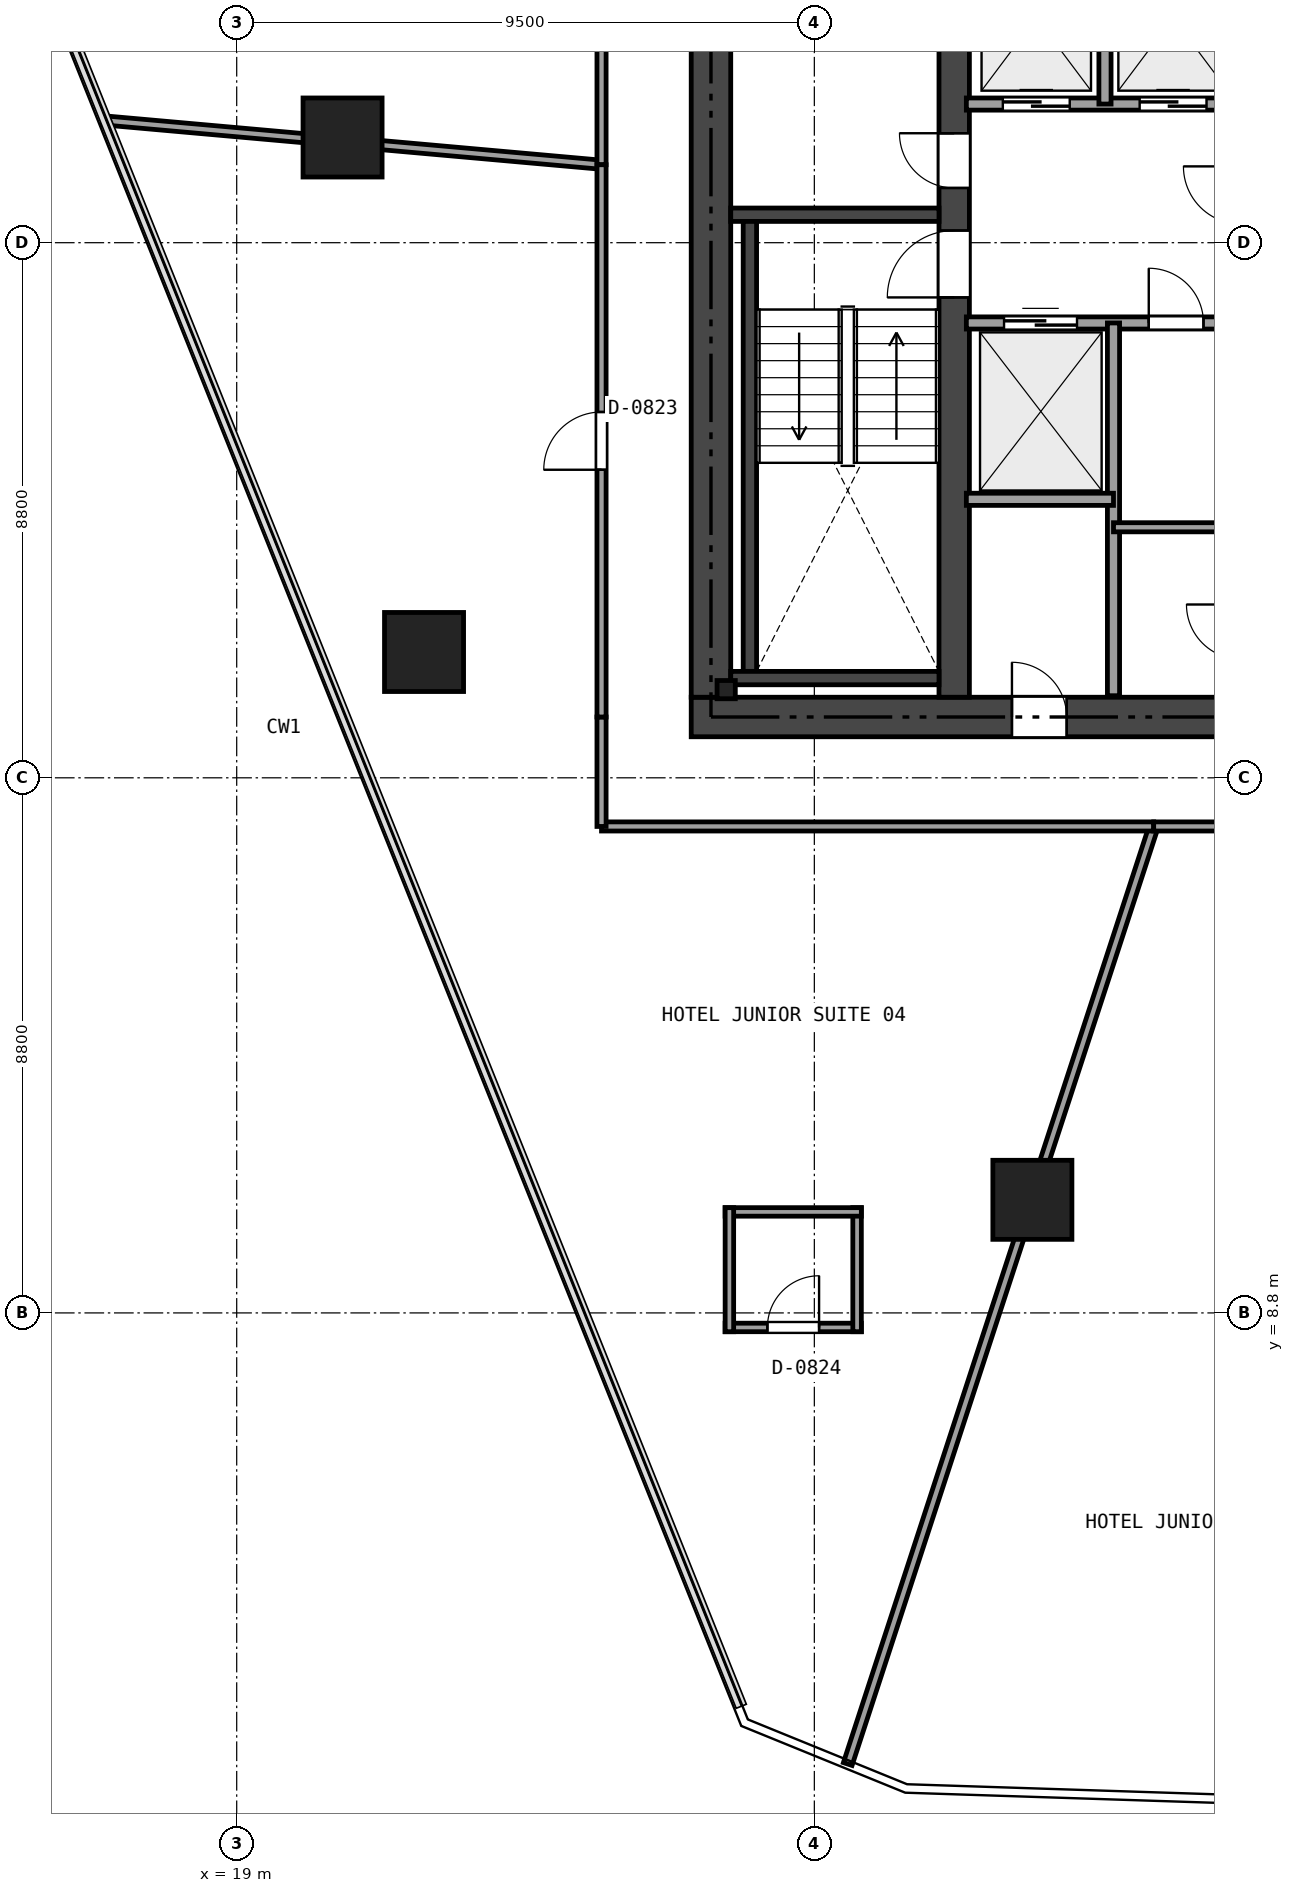
"""IFC4 building model, lengths in metres.
Left out: names, types, materials, properties, quantities, classifications, styles, units other than length and angle.
Written with IfcOpenShell. Run it as: python <this file> out.ifc"""

import sys

from ifc_helpers import new_model, si_unit, direction, frame, frame_2d, origin, origin_2d, place, context, subcontext, project, spatial, rectangle, i_section, extrude, element, fill, save


model = new_model("IFC4")
c1 = context("Model", 3, precision=1e-05, world=origin(), true_north=direction((0.0, 1.0)))
c2 = subcontext(c1, "Body", "Model", "MODEL_VIEW")
j1 = project(units=[si_unit("LENGTHUNIT", "METRE"), si_unit("PLANEANGLEUNIT", "RADIAN")], contexts=[c1])
p1 = place(None, origin())
s1 = spatial("IfcSite", under=j1, at=p1, CompositionType="ELEMENT")
p2 = place(p1, origin())
s2 = spatial("IfcBuilding", under=s1, at=p2, CompositionType="ELEMENT")
p3 = place(p2, frame((0.0, 0.0, 37.35)))
s3 = spatial("IfcBuildingStorey", under=s2, at=p3, CompositionType="ELEMENT", Elevation=37.35)
p4 = place(p3, frame((26.475, 18.6, 0.0), z_axis=(0.0, 0.0, 1.0), x_axis=(1.0, 0.0, 0.0)))
e1 = element("IfcWall", 1, at=p4, inside=s3, PredefinedType="SHEAR", context=c2, shape_type="SweptSolid", body=[
    extrude(rectangle(XDim=21.45, YDim=0.65, at=frame_2d((10.725, 0.0))), origin(), (0.0, 0.0, 1.0), 3.17),
])
p5 = place(p4, frame((12.45, 0.0, 0.0)))
e2 = element("IfcOpeningElement", 2, at=p5, cuts=e1, PredefinedType="OPENING", context=c2, shape_type="SweptSolid", body=[
    extrude(rectangle(XDim=1.15, YDim=2.15, at=frame_2d((0.575, 1.075))), frame((0.0, 0.335, 0.0), z_axis=(0.0, -1.0, 0.0), x_axis=(1.0, 0.0, 0.0)), (0.0, 0.0, 1.0), 0.67),
])
p6 = place(p4, frame((5.275, 0.0, 0.0)))
e3 = element("IfcOpeningElement", 3, at=p6, cuts=e1, PredefinedType="OPENING", context=c2, shape_type="SweptSolid", body=[
    extrude(rectangle(XDim=0.9, YDim=2.1, at=frame_2d((0.45, 1.05))), frame((0.0, 0.335, 0.0), z_axis=(0.0, -1.0, 0.0), x_axis=(1.0, 0.0, 0.0)), (0.0, 0.0, 1.0), 0.67),
])
p7 = place(p3, frame((26.8, 18.925, 0.0), z_axis=(0.0, 0.0, 1.0), x_axis=(0.0, 1.0, 0.0)))
e4 = element("IfcWall", 4, at=p7, inside=s3, PredefinedType="SHEAR", context=c2, shape_type="SweptSolid", body=[
    extrude(rectangle(XDim=14.95, YDim=0.65, at=frame_2d((7.475, 0.0))), origin(), (0.0, 0.0, 1.0), 3.17),
])
p8 = place(p3, frame((30.8, 18.925, 0.0), z_axis=(0.0, 0.0, 1.0), x_axis=(0.0, 1.0, 0.0)))
e5 = element("IfcWall", 5, at=p8, inside=s3, PredefinedType="SHEAR", context=c2, shape_type="SweptSolid", body=[
    extrude(rectangle(XDim=14.95, YDim=0.5, at=frame_2d((7.475, 0.0))), origin(), (0.0, 0.0, 1.0), 3.17),
])
p9 = place(p8, frame((6.575, 0.0, 0.0)))
e6 = element("IfcOpeningElement", 6, at=p9, cuts=e5, PredefinedType="OPENING", context=c2, shape_type="SweptSolid", body=[
    extrude(rectangle(XDim=1.1, YDim=2.15, at=frame_2d((0.55, 1.075))), frame((0.0, 0.26, 0.0), z_axis=(0.0, -1.0, 0.0), x_axis=(1.0, 0.0, 0.0)), (0.0, 0.0, 1.0), 0.52),
])
p10 = place(p8, frame((8.375, 0.0, 0.0)))
e7 = element("IfcOpeningElement", 7, at=p10, cuts=e5, PredefinedType="OPENING", context=c2, shape_type="SweptSolid", body=[
    extrude(rectangle(XDim=0.9, YDim=2.1, at=frame_2d((0.45, 1.05))), frame((0.0, 0.26, 0.0), z_axis=(0.0, -1.0, 0.0), x_axis=(1.0, 0.0, 0.0)), (0.0, 0.0, 1.0), 0.52),
])
p11 = place(p3, frame((27.125, 26.86, 0.0), z_axis=(0.0, 0.0, 1.0), x_axis=(1.0, 0.0, 0.0)))
e8 = element("IfcWall", 8, at=p11, inside=s3, PredefinedType="SHEAR", context=c2, shape_type="SweptSolid", body=[
    extrude(rectangle(XDim=3.425, YDim=0.22, at=frame_2d((1.712, 0.0))), origin(), (0.0, 0.0, 1.0), 3.17),
])
p12 = place(p3, frame((27.44, 19.35, 0.0), z_axis=(0.0, 0.0, 1.0), x_axis=(0.0, 1.0, 0.0)))
e9 = element("IfcWall", 9, at=p12, inside=s3, PredefinedType="SHEAR", context=c2, shape_type="SweptSolid", body=[
    extrude(rectangle(XDim=7.4, YDim=0.22, at=frame_2d((3.7, 0.0))), origin(), (0.0, 0.0, 1.0), 3.17),
])
p13 = place(p3, frame((27.125, 19.24, 0.0), z_axis=(0.0, 0.0, 1.0), x_axis=(1.0, 0.0, 0.0)))
e10 = element("IfcWall", 10, at=p13, inside=s3, PredefinedType="SHEAR", context=c2, shape_type="SweptSolid", body=[
    extrude(rectangle(XDim=3.425, YDim=0.22, at=frame_2d((1.712, 0.0))), origin(), (0.0, 0.0, 1.0), 3.17),
])
for number, where, z_axis, x_axis in (
    (11, (20.741, 28.13, 0.0), (0.0, 0.0, 1.0), (1.0, 0.0, 0.0)),
    (12, (22.081, 19.669, 0.0), (0.0, 0.0, 1.0), (1.0, 0.0, 0.0)),
    (13, (32.086, 10.66, 0.0), (0.0, 0.0, 1.0), (1.0, 0.0, 0.0)),
):
    element("IfcColumn", number, at=place(p3, frame(where, z_axis=z_axis, x_axis=x_axis)), inside=s3, PredefinedType="COLUMN", context=c2, shape_type="SweptSolid", body=[
        extrude(rectangle(XDim=1.3, YDim=1.3, at=origin_2d()), origin(), (0.0, 0.0, 1.0), 3.17),
    ])
p14 = place(p3, frame((27.05, 19.05, 0.0), z_axis=(0.0, 0.0, 1.0), x_axis=(1.0, 0.0, 0.0)))
e14 = element("IfcColumn", 14, at=p14, inside=s3, PredefinedType="PILASTER", context=c2, shape_type="SweptSolid", body=[
    extrude(i_section(OverallWidth=0.3, OverallDepth=0.3, WebThickness=0.011, FlangeThickness=0.019, at=origin_2d()), origin(), (0.0, 0.0, 1.0), 3.17),
])
p15 = place(p3, frame((31.0, 28.68, 0.0), z_axis=(0.0, 0.0, 1.0), x_axis=(1.0, 0.0, 0.0)))
e15 = element("IfcWall", 15, at=p15, inside=s3, PredefinedType="SOLIDWALL", context=c2, shape_type="SweptSolid", body=[
    extrude(rectangle(XDim=4.42, YDim=0.2, at=frame_2d((2.21, 0.0))), origin(), (0.0, 0.0, 1.0), 3.17),
])
p16 = place(p15, frame((0.6, 0.0, 0.0)))
e16 = element("IfcOpeningElement", 16, at=p16, cuts=e15, PredefinedType="OPENING", context=c2, shape_type="SweptSolid", body=[
    extrude(rectangle(XDim=1.1, YDim=2.15, at=frame_2d((0.55, 1.075))), frame((0.0, 0.11, 0.0), z_axis=(0.0, -1.0, 0.0), x_axis=(1.0, 0.0, 0.0)), (0.0, 0.0, 1.0), 0.22),
])
p17 = place(p15, frame((2.85, 0.0, 0.0)))
e17 = element("IfcOpeningElement", 17, at=p17, cuts=e15, PredefinedType="OPENING", context=c2, shape_type="SweptSolid", body=[
    extrude(rectangle(XDim=1.1, YDim=2.15, at=frame_2d((0.55, 1.075))), frame((0.0, 0.11, 0.0), z_axis=(0.0, -1.0, 0.0), x_axis=(1.0, 0.0, 0.0)), (0.0, 0.0, 1.0), 0.22),
])
p18 = place(p3, frame((33.28, 28.68, 0.0), z_axis=(0.0, 0.0, 1.0), x_axis=(0.0, 1.0, 0.0)))
e18 = element("IfcWall", 18, at=p18, inside=s3, PredefinedType="SOLIDWALL", context=c2, shape_type="SweptSolid", body=[
    extrude(rectangle(XDim=2.82, YDim=0.2, at=frame_2d((1.41, 0.0))), origin(), (0.0, 0.0, 1.0), 3.17),
])
p19 = place(p3, frame((31.0, 25.08, 0.0), z_axis=(0.0, 0.0, 1.0), x_axis=(1.0, 0.0, 0.0)))
e19 = element("IfcWall", 19, at=p19, inside=s3, PredefinedType="SOLIDWALL", context=c2, shape_type="SweptSolid", body=[
    extrude(rectangle(XDim=4.42, YDim=0.2, at=frame_2d((2.21, 0.0))), origin(), (0.0, 0.0, 1.0), 3.17),
])
p20 = place(p19, frame((3.0, 0.0, 0.0)))
e20 = element("IfcOpeningElement", 20, at=p20, cuts=e19, PredefinedType="OPENING", context=c2, shape_type="SweptSolid", body=[
    extrude(rectangle(XDim=0.9, YDim=2.1, at=frame_2d((0.45, 1.05))), frame((0.0, 0.11, 0.0), z_axis=(0.0, -1.0, 0.0), x_axis=(1.0, 0.0, 0.0)), (0.0, 0.0, 1.0), 0.22),
])
p21 = place(p19, frame((0.62, 0.0, 0.0)))
e21 = element("IfcOpeningElement", 21, at=p21, cuts=e19, PredefinedType="OPENING", context=c2, shape_type="SweptSolid", body=[
    extrude(rectangle(XDim=1.2, YDim=2.15, at=frame_2d((0.6, 1.075))), frame((0.0, 0.11, 0.0), z_axis=(0.0, -1.0, 0.0), x_axis=(1.0, 0.0, 0.0)), (0.0, 0.0, 1.0), 0.22),
])
p22 = place(p3, frame((33.42, 18.95, 0.0), z_axis=(0.0, 0.0, 1.0), x_axis=(0.0, 1.0, 0.0)))
e22 = element("IfcWall", 22, at=p22, inside=s3, PredefinedType="SOLIDWALL", context=c2, shape_type="SweptSolid", body=[
    extrude(rectangle(XDim=6.13, YDim=0.2, at=frame_2d((3.065, 0.0))), origin(), (0.0, 0.0, 1.0), 2.691),
])
p23 = place(p3, frame((31.0, 22.18, 0.0), z_axis=(0.0, 0.0, 1.0), x_axis=(1.0, 0.0, 0.0)))
e23 = element("IfcWall", 23, at=p23, inside=s3, PredefinedType="SOLIDWALL", context=c2, shape_type="SweptSolid", body=[
    extrude(rectangle(XDim=2.42, YDim=0.2, at=frame_2d((1.21, 0.0))), origin(), (0.0, 0.0, 1.0), 3.17),
])
p24 = place(p3, frame((33.42, 21.72, 0.0), z_axis=(0.0, 0.0, 1.0), x_axis=(1.0, 0.0, 0.0)))
e24 = element("IfcWall", 24, at=p24, inside=s3, PredefinedType="PARTITIONING", context=c2, shape_type="SweptSolid", body=[
    extrude(rectangle(XDim=2.0, YDim=0.15, at=frame_2d((1.0, 0.0))), origin(), (0.0, 0.0, 1.0), 3.17),
])
p25 = place(p3, frame((27.033, 8.561, 0.0), z_axis=(0.0, 0.0, 1.0), x_axis=(1.0, 0.0, 0.0)))
e25 = element("IfcWall", 25, at=p25, inside=s3, PredefinedType="PARTITIONING", context=c2, shape_type="SweptSolid", body=[
    extrude(rectangle(XDim=2.24, YDim=0.14, at=frame_2d((1.12, 0.0))), origin(), (0.0, 0.0, 1.0), 3.17),
])
p26 = place(p25, frame((0.695, 0.0, 0.0)))
e26 = element("IfcOpeningElement", 26, at=p26, cuts=e25, PredefinedType="OPENING", context=c2, shape_type="SweptSolid", body=[
    extrude(rectangle(XDim=0.85, YDim=2.1, at=frame_2d((0.425, 1.05))), frame((0.0, 0.08, 0.0), z_axis=(0.0, -1.0, 0.0), x_axis=(1.0, 0.0, 0.0)), (0.0, 0.0, 1.0), 0.16),
])
p27 = place(p3, frame((29.203, 8.491, 0.0), z_axis=(0.0, 0.0, 1.0), x_axis=(0.0, 1.0, 0.0)))
e27 = element("IfcWall", 27, at=p27, inside=s3, PredefinedType="PARTITIONING", context=c2, shape_type="SweptSolid", body=[
    extrude(rectangle(XDim=2.04, YDim=0.14, at=frame_2d((1.02, 0.0))), origin(), (0.0, 0.0, 1.0), 3.17),
])
p28 = place(p3, frame((29.273, 10.461, 0.0), z_axis=(0.0, 0.0, 1.0), x_axis=(-1.0, 0.0, 0.0)))
e28 = element("IfcWall", 28, at=p28, inside=s3, PredefinedType="PARTITIONING", context=c2, shape_type="SweptSolid", body=[
    extrude(rectangle(XDim=2.24, YDim=0.14, at=frame_2d((1.12, 0.0))), origin(), (0.0, 0.0, 1.0), 3.17),
])
p29 = place(p3, frame((27.103, 10.531, 0.0), z_axis=(0.0, 0.0, 1.0), x_axis=(0.0, -1.0, 0.0)))
e29 = element("IfcWall", 29, at=p29, inside=s3, PredefinedType="PARTITIONING", context=c2, shape_type="SweptSolid", body=[
    extrude(rectangle(XDim=2.04, YDim=0.14, at=frame_2d((1.02, 0.0))), origin(), (0.0, 0.0, 1.0), 3.17),
])
p30 = place(p3, frame((16.792, 28.414, 0.0), z_axis=(0.0, 0.0, 1.0), x_axis=(0.996045012521, -0.088850059267, 0.0)))
e30 = element("IfcWall", 30, at=p30, inside=s3, PredefinedType="PARTITIONING", context=c2, shape_type="SweptSolid", body=[
    extrude(rectangle(XDim=8.24, YDim=0.15, at=frame_2d((4.12, 0.0))), origin(), (0.0, 0.0, 1.0), 2.395),
])
p31 = place(p3, frame((25.0, 27.682, 0.0), z_axis=(0.0, 0.0, 1.0), x_axis=(0.0, 1.0, 0.0)))
e31 = element("IfcWall", 31, at=p31, inside=s3, PredefinedType="PARTITIONING", context=c2, shape_type="SweptSolid", body=[
    extrude(rectangle(XDim=8.318, YDim=0.15, at=frame_2d((4.159, 0.0))), origin(), (0.0, 0.0, 1.0), 2.355),
])
p32 = place(p31, frame((3.684, 0.0, 0.0)))
e32 = element("IfcOpeningElement", 32, at=p32, cuts=e31, PredefinedType="OPENING", context=c2, shape_type="SweptSolid", body=[
    extrude(rectangle(XDim=0.95, YDim=2.15, at=frame_2d((0.475, 1.075))), frame((0.0, 0.085, 0.0), z_axis=(0.0, -1.0, 0.0), x_axis=(1.0, 0.0, 0.0)), (0.0, 0.0, 1.0), 0.17),
])
p33 = place(p3, frame((29.049, 1.381, 0.0), z_axis=(0.0, 0.0, 1.0), x_axis=(0.310247156609, 0.950655932405, 0.0)))
e33 = element("IfcWall", 33, at=p33, inside=s3, PredefinedType="PARTITIONING", context=c2, shape_type="SweptSolid", body=[
    extrude(rectangle(XDim=16.219, YDim=0.15, at=frame_2d((8.11, 0.0))), origin(), (0.0, 0.0, 1.0), 2.395),
])
p34 = place(p3, frame((34.081, 16.8, 0.0), z_axis=(0.0, 0.0, 1.0), x_axis=(-1.0, 0.0, 0.0)))
e34 = element("IfcWall", 34, at=p34, inside=s3, PredefinedType="PARTITIONING", context=c2, shape_type="SweptSolid", body=[
    extrude(rectangle(XDim=9.081, YDim=0.15, at=frame_2d((4.541, 0.0))), origin(), (0.0, 0.0, 1.0), 2.355),
])
p35 = place(p3, frame((25.0, 16.8, 0.0), z_axis=(0.0, 0.0, 1.0), x_axis=(0.0, 1.0, 0.0)))
e35 = element("IfcWall", 35, at=p35, inside=s3, PredefinedType="PARTITIONING", context=c2, shape_type="SweptSolid", body=[
    extrude(rectangle(XDim=1.8, YDim=0.15, at=frame_2d((0.9, 0.0))), origin(), (0.0, 0.0, 1.0), 2.355),
])
p36 = place(p3, frame((25.0, 18.6, 0.0), z_axis=(0.0, 0.0, 1.0), x_axis=(0.0, 1.0, 0.0)))
e36 = element("IfcWall", 36, at=p36, inside=s3, PredefinedType="PARTITIONING", context=c2, shape_type="SweptSolid", body=[
    extrude(rectangle(XDim=9.082, YDim=0.15, at=frame_2d((4.541, 0.0))), origin(), (0.0, 0.0, 1.0), 2.395),
])
p37 = place(p36, frame((4.066, 0.0, 0.0)))
e37 = element("IfcOpeningElement", 37, at=p37, cuts=e36, PredefinedType="OPENING", context=c2, shape_type="SweptSolid", body=[
    extrude(rectangle(XDim=0.95, YDim=2.15, at=frame_2d((0.475, 1.075))), frame((0.0, 0.085, 0.0), z_axis=(0.0, -1.0, 0.0), x_axis=(1.0, 0.0, 0.0)), (0.0, 0.0, 1.0), 0.17),
])
p38 = place(p3, frame((41.079, 16.8, 0.0), z_axis=(0.0, 0.0, 1.0), x_axis=(-1.0, 0.0, 0.0)))
e38 = element("IfcWall", 38, at=p38, inside=s3, PredefinedType="PARTITIONING", context=c2, shape_type="SweptSolid", body=[
    extrude(rectangle(XDim=6.998, YDim=0.15, at=frame_2d((3.499, 0.0))), origin(), (0.0, 0.0, 1.0), 2.395),
])
p39 = place(p38, frame((3.024, 0.0, 0.0)))
e39 = element("IfcOpeningElement", 39, at=p39, cuts=e38, PredefinedType="OPENING", context=c2, shape_type="SweptSolid", body=[
    extrude(rectangle(XDim=0.95, YDim=2.15, at=frame_2d((0.475, 1.075))), frame((0.0, 0.085, 0.0), z_axis=(0.0, -1.0, 0.0), x_axis=(1.0, 0.0, 0.0)), (0.0, 0.0, 1.0), 0.17),
])
p40 = place(p9, origin())
e40 = element("IfcDoor", 40, at=p40, inside=s3, OperationType="SINGLE_SWING_LEFT", PredefinedType="DOOR", context=c2, shape_type="SweptSolid", body=[
    extrude(rectangle(XDim=1.1, YDim=2.15, at=frame_2d((0.55, 1.075))), frame((0.0, 0.025, 0.0), z_axis=(0.0, -1.0, 0.0), x_axis=(1.0, 0.0, 0.0)), (0.0, 0.0, 1.0), 0.05),
])
fill(e6, e40)
p41 = place(p10, origin())
e41 = element("IfcDoor", 41, at=p41, inside=s3, OperationType="SINGLE_SWING_RIGHT", PredefinedType="DOOR", context=c2, shape_type="SweptSolid", body=[
    extrude(rectangle(XDim=0.9, YDim=2.1, at=frame_2d((0.45, 1.05))), frame((0.0, 0.025, 0.0), z_axis=(0.0, -1.0, 0.0), x_axis=(1.0, 0.0, 0.0)), (0.0, 0.0, 1.0), 0.05),
])
fill(e7, e41)
p42 = place(p6, origin())
e42 = element("IfcDoor", 42, at=p42, inside=s3, OperationType="SINGLE_SWING_LEFT", PredefinedType="DOOR", context=c2, shape_type="SweptSolid", body=[
    extrude(rectangle(XDim=0.9, YDim=2.1, at=frame_2d((0.45, 1.05))), frame((0.0, 0.025, 0.0), z_axis=(0.0, -1.0, 0.0), x_axis=(1.0, 0.0, 0.0)), (0.0, 0.0, 1.0), 0.05),
])
fill(e3, e42)
p43 = place(p20, origin())
e43 = element("IfcDoor", 43, at=p43, inside=s3, OperationType="SINGLE_SWING_LEFT", PredefinedType="DOOR", context=c2, shape_type="SweptSolid", body=[
    extrude(rectangle(XDim=0.9, YDim=2.1, at=frame_2d((0.45, 1.05))), frame((0.0, 0.025, 0.0), z_axis=(0.0, -1.0, 0.0), x_axis=(1.0, 0.0, 0.0)), (0.0, 0.0, 1.0), 0.05),
])
fill(e20, e43)
p44 = place(p16, origin())
e44 = element("IfcDoor", 44, at=p44, inside=s3, OperationType="SLIDING_TO_LEFT", PredefinedType="DOOR", context=c2, shape_type="SweptSolid", body=[
    extrude(rectangle(XDim=1.1, YDim=2.15, at=frame_2d((0.55, 1.075))), frame((0.0, 0.025, 0.0), z_axis=(0.0, -1.0, 0.0), x_axis=(1.0, 0.0, 0.0)), (0.0, 0.0, 1.0), 0.05),
])
fill(e16, e44)
p45 = place(p17, origin())
e45 = element("IfcDoor", 45, at=p45, inside=s3, OperationType="SLIDING_TO_LEFT", PredefinedType="DOOR", context=c2, shape_type="SweptSolid", body=[
    extrude(rectangle(XDim=1.1, YDim=2.15, at=frame_2d((0.55, 1.075))), frame((0.0, 0.025, 0.0), z_axis=(0.0, -1.0, 0.0), x_axis=(1.0, 0.0, 0.0)), (0.0, 0.0, 1.0), 0.05),
])
fill(e17, e45)
p46 = place(p21, origin())
e46 = element("IfcDoor", 46, at=p46, inside=s3, OperationType="SLIDING_TO_LEFT", PredefinedType="DOOR", context=c2, shape_type="SweptSolid", body=[
    extrude(rectangle(XDim=1.2, YDim=2.15, at=frame_2d((0.6, 1.075))), frame((0.0, 0.025, 0.0), z_axis=(0.0, -1.0, 0.0), x_axis=(1.0, 0.0, 0.0)), (0.0, 0.0, 1.0), 0.05),
])
fill(e21, e46)
p47 = place(p37, origin())
e47 = element("IfcDoor", 47, at=p47, inside=s3, OperationType="SINGLE_SWING_LEFT", PredefinedType="DOOR", context=c2, shape_type="SweptSolid", body=[
    extrude(rectangle(XDim=0.95, YDim=2.15, at=frame_2d((0.475, 1.075))), frame((0.0, 0.025, 0.0), z_axis=(0.0, -1.0, 0.0), x_axis=(1.0, 0.0, 0.0)), (0.0, 0.0, 1.0), 0.05),
])
fill(e37, e47)
p48 = place(p26, origin())
e48 = element("IfcDoor", 48, at=p48, inside=s3, OperationType="SINGLE_SWING_RIGHT", PredefinedType="DOOR", context=c2, shape_type="SweptSolid", body=[
    extrude(rectangle(XDim=0.85, YDim=2.1, at=frame_2d((0.425, 1.05))), frame((0.0, 0.025, 0.0), z_axis=(0.0, -1.0, 0.0), x_axis=(1.0, 0.0, 0.0)), (0.0, 0.0, 1.0), 0.05),
])
fill(e26, e48)
save(model, sys.argv[1])
